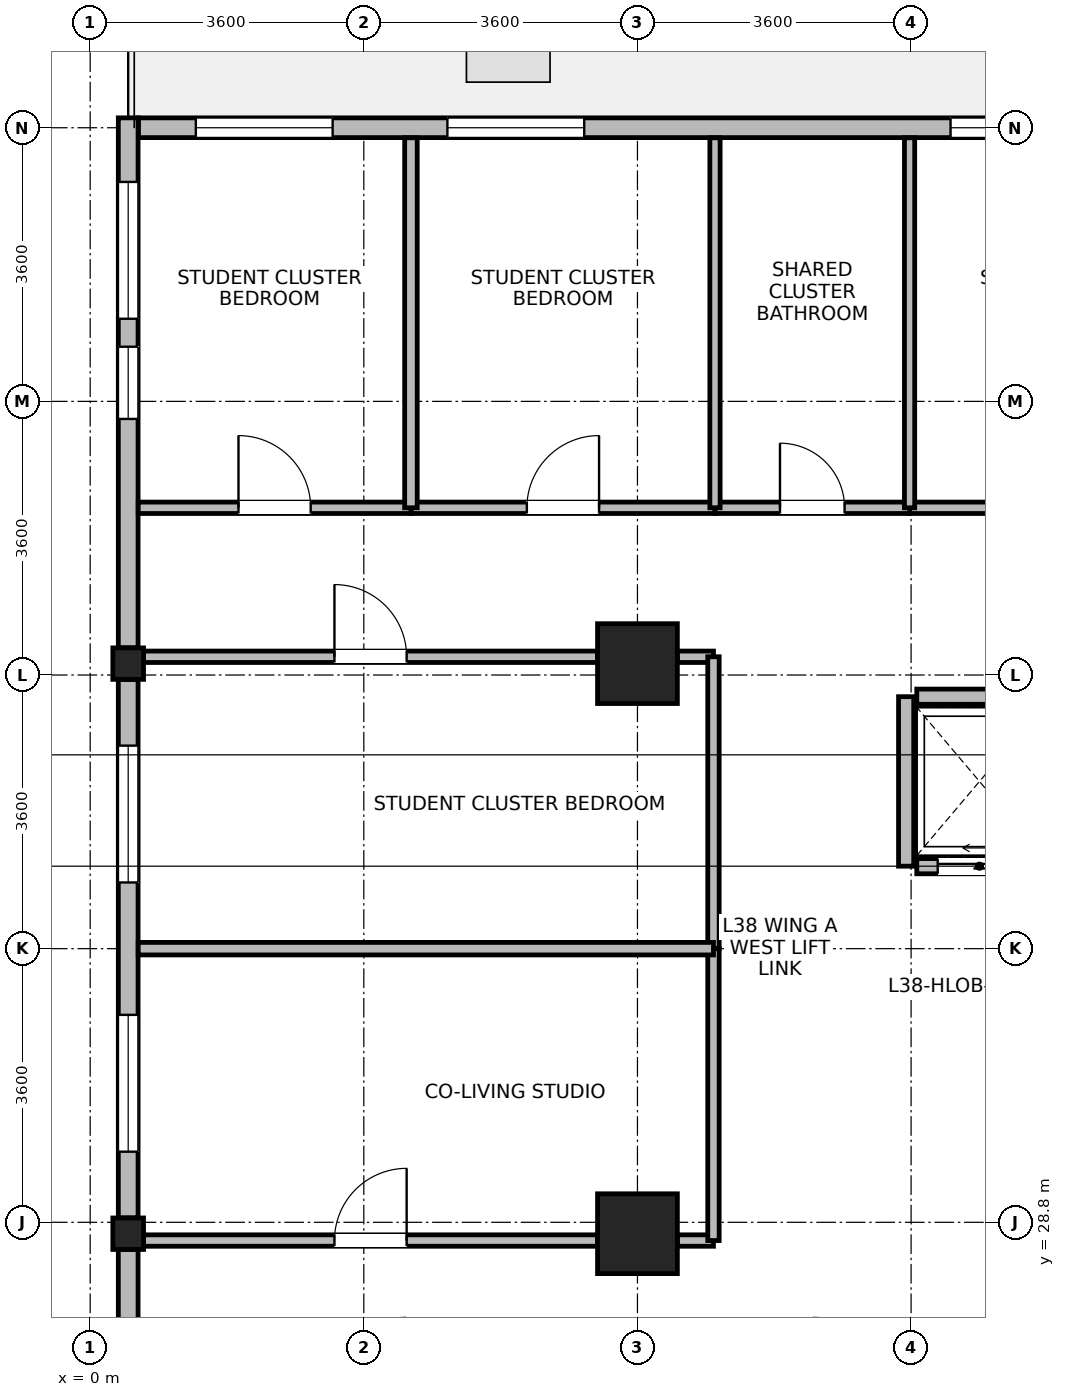
"""IFC4 building model, lengths in metres.
Left out: names, types, materials, properties, quantities, classifications, styles, units other than length and angle.
Written with IfcOpenShell. Run it as: python <this file> out.ifc"""

import sys

from ifc_helpers import new_model, si_unit, direction, frame, frame_2d, origin, origin_2d, place, context, subcontext, project, spatial, rectangle, i_section, extrude, source, transform, mapped, element, fill, save


model = new_model("IFC4")
c1 = context("Model", 3, precision=1e-05, world=origin(), true_north=direction((0.0, 1.0)))
c2 = subcontext(c1, "Body", "Model", "MODEL_VIEW")
j1 = project(units=[si_unit("LENGTHUNIT", "METRE"), si_unit("PLANEANGLEUNIT", "RADIAN")], contexts=[c1])
p1 = place(None, origin())
s1 = spatial("IfcSite", under=j1, at=p1, CompositionType="ELEMENT")
p2 = place(p1, origin())
s2 = spatial("IfcBuilding", under=s1, at=p2, CompositionType="ELEMENT")
p3 = place(p2, frame((0.0, 0.0, 151.3)))
s3 = spatial("IfcBuildingStorey", under=s2, at=p3, CompositionType="ELEMENT", Elevation=151.3)
m1 = source(origin(), c2, "Body", "SweptSolid", [
    extrude(rectangle(XDim=1.05, YDim=1.05, at=origin_2d()), origin(), (0.0, 0.0, 1.0), 3.7),
])
for number, where, z_axis, x_axis in (
    (1, (7.2, 28.65, 0.0), (0.0, 0.0, 1.0), (1.0, 0.0, 0.0)),
    (2, (7.2, 36.15, 0.0), (0.0, 0.0, 1.0), (1.0, 0.0, 0.0)),
):
    element("IfcColumn", number, at=place(p3, frame(where, z_axis=z_axis, x_axis=x_axis)), inside=s3, PredefinedType="COLUMN", context=c2, shape_type="MappedRepresentation", body=[
        mapped(m1, transform((0.0, 0.0, 0.0), x_axis=(1.0, 0.0, 0.0), y_axis=(0.0, 1.0, 0.0), z_axis=(0.0, 0.0, 1.0), scale=1.0)),
    ])
m2 = source(origin(), c2, "Body", "SweptSolid", [
    extrude(i_section(OverallWidth=0.404, OverallDepth=0.414, WebThickness=0.021, FlangeThickness=0.028, FilletRadius=0.015, at=origin_2d()), origin(), (0.0, 0.0, 1.0), 3.7),
])
for number, where, z_axis, x_axis in (
    (3, (0.5, 28.65, 0.0), (0.0, 0.0, 1.0), (1.0, 0.0, 0.0)),
    (4, (0.5, 36.15, 0.0), (0.0, 0.0, 1.0), (1.0, 0.0, 0.0)),
):
    element("IfcColumn", number, at=place(p3, frame(where, z_axis=z_axis, x_axis=x_axis)), inside=s3, PredefinedType="COLUMN", context=c2, shape_type="MappedRepresentation", body=[
        mapped(m2, transform((0.0, 0.0, 0.0), x_axis=(1.0, 0.0, 0.0), y_axis=(0.0, 1.0, 0.0), z_axis=(0.0, 0.0, 1.0), scale=1.0)),
    ])
p4 = place(p3, frame((0.635, 43.2, 0.0), z_axis=(0.0, 0.0, 1.0), x_axis=(1.0, 0.0, 0.0)))
e5 = element("IfcWall", 5, at=p4, inside=s3, PredefinedType="STANDARD", context=c2, shape_type="SweptSolid", body=[
    extrude(rectangle(XDim=13.239, YDim=0.26, at=frame_2d((6.62, 0.0))), origin(), (0.0, 0.0, 1.0), 3.44),
])
p5 = place(p4, frame((0.755, 0.0, 0.85)))
e6 = element("IfcOpeningElement", 6, at=p5, cuts=e5, PredefinedType="OPENING", context=c2, shape_type="SweptSolid", body=[
    extrude(rectangle(XDim=1.8, YDim=1.85, at=frame_2d((0.9, 0.925))), frame((0.0, 0.14, 0.0), z_axis=(0.0, -1.0, 0.0), x_axis=(1.0, 0.0, 0.0)), (0.0, 0.0, 1.0), 0.28),
])
p6 = place(p4, frame((4.065, 0.0, 0.85)))
e7 = element("IfcOpeningElement", 7, at=p6, cuts=e5, PredefinedType="OPENING", context=c2, shape_type="SweptSolid", body=[
    extrude(rectangle(XDim=1.8, YDim=1.85, at=frame_2d((0.9, 0.925))), frame((0.0, 0.14, 0.0), z_axis=(0.0, -1.0, 0.0), x_axis=(1.0, 0.0, 0.0)), (0.0, 0.0, 1.0), 0.28),
])
p7 = place(p4, frame((10.684, 0.0, 0.85)))
e8 = element("IfcOpeningElement", 8, at=p7, cuts=e5, PredefinedType="OPENING", context=c2, shape_type="SweptSolid", body=[
    extrude(rectangle(XDim=1.8, YDim=1.85, at=frame_2d((0.9, 0.925))), frame((0.0, 0.14, 0.0), z_axis=(0.0, -1.0, 0.0), x_axis=(1.0, 0.0, 0.0)), (0.0, 0.0, 1.0), 0.28),
])
p8 = place(p3, frame((0.5, 36.358, 0.0), z_axis=(0.0, 0.0, 1.0), x_axis=(0.0, 1.0, 0.0)))
e9 = element("IfcWall", 9, at=p8, inside=s3, PredefinedType="STANDARD", context=c2, shape_type="SweptSolid", body=[
    extrude(rectangle(XDim=6.972, YDim=0.26, at=frame_2d((3.486, 0.0))), origin(), (0.0, 0.0, 1.0), 3.44),
])
p9 = place(p8, frame((4.329, 0.0, 0.85)))
e10 = element("IfcOpeningElement", 10, at=p9, cuts=e9, PredefinedType="OPENING", context=c2, shape_type="SweptSolid", body=[
    extrude(rectangle(XDim=1.8, YDim=1.85, at=frame_2d((0.9, 0.925))), frame((0.0, 0.14, 0.0), z_axis=(0.0, -1.0, 0.0), x_axis=(1.0, 0.0, 0.0)), (0.0, 0.0, 1.0), 0.28),
])
p10 = place(p8, frame((3.011, 0.0, 0.85)))
e11 = element("IfcOpeningElement", 11, at=p10, cuts=e9, PredefinedType="OPENING", context=c2, shape_type="SweptSolid", body=[
    extrude(rectangle(XDim=0.95, YDim=1.75, at=frame_2d((0.475, 0.875))), frame((0.0, 0.14, 0.0), z_axis=(0.0, -1.0, 0.0), x_axis=(1.0, 0.0, 0.0)), (0.0, 0.0, 1.0), 0.28),
])
p11 = place(p3, frame((0.5, 28.858, 0.0), z_axis=(0.0, 0.0, 1.0), x_axis=(0.0, 1.0, 0.0)))
e12 = element("IfcWall", 12, at=p11, inside=s3, PredefinedType="STANDARD", context=c2, shape_type="SweptSolid", body=[
    extrude(rectangle(XDim=7.084, YDim=0.26, at=frame_2d((3.542, 0.0))), origin(), (0.0, 0.0, 1.0), 2.99),
])
p12 = place(p11, frame((0.871, 0.0, 0.85)))
e13 = element("IfcOpeningElement", 13, at=p12, cuts=e12, PredefinedType="OPENING", context=c2, shape_type="SweptSolid", body=[
    extrude(rectangle(XDim=1.8, YDim=1.85, at=frame_2d((0.9, 0.925))), frame((0.0, 0.14, 0.0), z_axis=(0.0, -1.0, 0.0), x_axis=(1.0, 0.0, 0.0)), (0.0, 0.0, 1.0), 0.28),
])
p13 = place(p11, frame((4.413, 0.0, 0.85)))
e14 = element("IfcOpeningElement", 14, at=p13, cuts=e12, PredefinedType="OPENING", context=c2, shape_type="SweptSolid", body=[
    extrude(rectangle(XDim=1.8, YDim=1.85, at=frame_2d((0.9, 0.925))), frame((0.0, 0.14, 0.0), z_axis=(0.0, -1.0, 0.0), x_axis=(1.0, 0.0, 0.0)), (0.0, 0.0, 1.0), 0.28),
])
p14 = place(p3, frame((0.5, 21.47, 0.0), z_axis=(0.0, 0.0, 1.0), x_axis=(0.0, 1.0, 0.0)))
e15 = element("IfcWall", 15, at=p14, inside=s3, PredefinedType="STANDARD", context=c2, shape_type="SweptSolid", body=[
    extrude(rectangle(XDim=6.972, YDim=0.26, at=frame_2d((3.486, 0.0))), origin(), (0.0, 0.0, 1.0), 3.44),
])
p15 = place(p14, frame((0.843, 0.0, 0.85)))
e16 = element("IfcOpeningElement", 16, at=p15, cuts=e15, PredefinedType="OPENING", context=c2, shape_type="SweptSolid", body=[
    extrude(rectangle(XDim=1.8, YDim=1.85, at=frame_2d((0.9, 0.925))), frame((0.0, 0.14, 0.0), z_axis=(0.0, -1.0, 0.0), x_axis=(1.0, 0.0, 0.0)), (0.0, 0.0, 1.0), 0.28),
])
p16 = place(p14, frame((3.011, 0.0, 0.85)))
e17 = element("IfcOpeningElement", 17, at=p16, cuts=e15, PredefinedType="OPENING", context=c2, shape_type="SweptSolid", body=[
    extrude(rectangle(XDim=0.95, YDim=1.75, at=frame_2d((0.475, 0.875))), frame((0.0, 0.14, 0.0), z_axis=(0.0, -1.0, 0.0), x_axis=(1.0, 0.0, 0.0)), (0.0, 0.0, 1.0), 0.28),
])
p17 = place(p3, frame((10.875, 33.485, 0.0), z_axis=(0.0, 0.0, 1.0), x_axis=(1.0, 0.0, 0.0)))
e18 = element("IfcWall", 18, at=p17, inside=s3, PredefinedType="PARTITIONING", context=c2, shape_type="SweptSolid", body=[
    extrude(rectangle(XDim=1.65, YDim=0.2, at=frame_2d((0.825, 0.0))), origin(), (0.0, 0.0, 1.0), 3.44),
])
p18 = place(p17, frame((0.275, 0.0, 0.0)))
e19 = element("IfcOpeningElement", 19, at=p18, cuts=e18, PredefinedType="OPENING", context=c2, shape_type="SweptSolid", body=[
    extrude(rectangle(XDim=1.1, YDim=2.12, at=frame_2d((0.55, 1.06))), frame((0.0, 0.11, 0.0), z_axis=(0.0, -1.0, 0.0), x_axis=(1.0, 0.0, 0.0)), (0.0, 0.0, 1.0), 0.22),
])
p19 = place(p3, frame((10.875, 35.715, 0.0), z_axis=(0.0, 0.0, 1.0), x_axis=(1.0, 0.0, 0.0)))
e20 = element("IfcWall", 20, at=p19, inside=s3, PredefinedType="PARTITIONING", context=c2, shape_type="SweptSolid", body=[
    extrude(rectangle(XDim=1.65, YDim=0.2, at=frame_2d((0.825, 0.0))), origin(), (0.0, 0.0, 1.0), 3.44),
])
p20 = place(p3, frame((10.735, 33.485, 0.0), z_axis=(0.0, 0.0, 1.0), x_axis=(0.0, 1.0, 0.0)))
e21 = element("IfcWall", 21, at=p20, inside=s3, PredefinedType="PARTITIONING", context=c2, shape_type="SweptSolid", body=[
    extrude(rectangle(XDim=2.23, YDim=0.2, at=frame_2d((1.115, 0.0))), origin(), (0.0, 0.0, 1.0), 3.44),
])
p21 = place(p3, frame((0.702, 28.56, 0.0), z_axis=(0.0, 0.0, 1.0), x_axis=(1.0, 0.0, 0.0)))
e22 = element("IfcWall", 22, at=p21, inside=s3, PredefinedType="PARTITIONING", context=c2, shape_type="SweptSolid", body=[
    extrude(rectangle(XDim=5.973, YDim=0.15, at=frame_2d((2.987, 0.0))), origin(), (0.0, 0.0, 1.0), 2.84),
])
p22 = place(p21, frame((2.511, 0.0, 0.0)))
e23 = element("IfcOpeningElement", 23, at=p22, cuts=e22, PredefinedType="OPENING", context=c2, shape_type="SweptSolid", body=[
    extrude(rectangle(XDim=0.95, YDim=2.1, at=frame_2d((0.475, 1.05))), frame((0.0, 0.085, 0.0), z_axis=(0.0, -1.0, 0.0), x_axis=(1.0, 0.0, 0.0)), (0.0, 0.0, 1.0), 0.17),
])
p23 = place(p3, frame((7.725, 28.56, 0.0), z_axis=(0.0, 0.0, 1.0), x_axis=(1.0, 0.0, 0.0)))
e24 = element("IfcWall", 24, at=p23, inside=s3, PredefinedType="PARTITIONING", context=c2, shape_type="SweptSolid", body=[
    extrude(rectangle(XDim=0.475, YDim=0.15, at=frame_2d((0.237, 0.0))), origin(), (0.0, 0.0, 1.0), 2.84),
])
p24 = place(p3, frame((0.702, 36.24, 0.0), z_axis=(0.0, 0.0, 1.0), x_axis=(1.0, 0.0, 0.0)))
e25 = element("IfcWall", 25, at=p24, inside=s3, PredefinedType="PARTITIONING", context=c2, shape_type="SweptSolid", body=[
    extrude(rectangle(XDim=5.973, YDim=0.15, at=frame_2d((2.987, 0.0))), origin(), (0.0, 0.0, 1.0), 2.84),
])
p25 = place(p24, frame((2.511, 0.0, 0.0)))
e26 = element("IfcOpeningElement", 26, at=p25, cuts=e25, PredefinedType="OPENING", context=c2, shape_type="SweptSolid", body=[
    extrude(rectangle(XDim=0.95, YDim=2.1, at=frame_2d((0.475, 1.05))), frame((0.0, 0.085, 0.0), z_axis=(0.0, -1.0, 0.0), x_axis=(1.0, 0.0, 0.0)), (0.0, 0.0, 1.0), 0.17),
])
p26 = place(p3, frame((7.725, 36.24, 0.0), z_axis=(0.0, 0.0, 1.0), x_axis=(1.0, 0.0, 0.0)))
e27 = element("IfcWall", 27, at=p26, inside=s3, PredefinedType="PARTITIONING", context=c2, shape_type="SweptSolid", body=[
    extrude(rectangle(XDim=0.475, YDim=0.15, at=frame_2d((0.237, 0.0))), origin(), (0.0, 0.0, 1.0), 2.84),
])
p27 = place(p3, frame((10.78, 38.2, 0.0), z_axis=(0.0, 0.0, 1.0), x_axis=(1.0, 0.0, 0.0)))
e28 = element("IfcWall", 28, at=p27, inside=s3, PredefinedType="PARTITIONING", context=c2, shape_type="SweptSolid", body=[
    extrude(rectangle(XDim=4.3, YDim=0.15, at=frame_2d((2.15, 0.0))), origin(), (0.0, 0.0, 1.0), 3.44),
])
p28 = place(p27, frame((1.675, 0.0, 0.0)))
e29 = element("IfcOpeningElement", 29, at=p28, cuts=e28, PredefinedType="OPENING", context=c2, shape_type="SweptSolid", body=[
    extrude(rectangle(XDim=0.95, YDim=2.1, at=frame_2d((0.475, 1.05))), frame((0.0, 0.085, 0.0), z_axis=(0.0, -1.0, 0.0), x_axis=(1.0, 0.0, 0.0)), (0.0, 0.0, 1.0), 0.17),
])
p29 = place(p3, frame((4.22, 38.2, 0.0), z_axis=(0.0, 0.0, 1.0), x_axis=(1.0, 0.0, 0.0)))
e30 = element("IfcWall", 30, at=p29, inside=s3, PredefinedType="PARTITIONING", context=c2, shape_type="SweptSolid", body=[
    extrude(rectangle(XDim=4.0, YDim=0.15, at=frame_2d((2.0, 0.0))), origin(), (0.0, 0.0, 1.0), 3.44),
])
p30 = place(p29, frame((1.525, 0.0, 0.0)))
e31 = element("IfcOpeningElement", 31, at=p30, cuts=e30, PredefinedType="OPENING", context=c2, shape_type="SweptSolid", body=[
    extrude(rectangle(XDim=0.95, YDim=2.1, at=frame_2d((0.475, 1.05))), frame((0.0, 0.085, 0.0), z_axis=(0.0, -1.0, 0.0), x_axis=(1.0, 0.0, 0.0)), (0.0, 0.0, 1.0), 0.17),
])
p31 = place(p3, frame((8.2, 32.4, 0.0), z_axis=(0.0, 0.0, 1.0), x_axis=(0.0, 1.0, 0.0)))
e32 = element("IfcWall", 32, at=p31, inside=s3, PredefinedType="PARTITIONING", context=c2, shape_type="SweptSolid", body=[
    extrude(rectangle(XDim=3.84, YDim=0.15, at=frame_2d((1.92, 0.0))), origin(), (0.0, 0.0, 1.0), 3.44),
])
p32 = place(p3, frame((8.2, 28.56, 0.0), z_axis=(0.0, 0.0, 1.0), x_axis=(0.0, 1.0, 0.0)))
e33 = element("IfcWall", 33, at=p32, inside=s3, PredefinedType="PARTITIONING", context=c2, shape_type="SweptSolid", body=[
    extrude(rectangle(XDim=3.84, YDim=0.15, at=frame_2d((1.92, 0.0))), origin(), (0.0, 0.0, 1.0), 3.44),
])
p33 = place(p3, frame((0.632, 38.2, 0.0), z_axis=(0.0, 0.0, 1.0), x_axis=(1.0, 0.0, 0.0)))
e34 = element("IfcWall", 34, at=p33, inside=s3, PredefinedType="PARTITIONING", context=c2, shape_type="SweptSolid", body=[
    extrude(rectangle(XDim=3.588, YDim=0.15, at=frame_2d((1.794, 0.0))), origin(), (0.0, 0.0, 1.0), 3.44),
])
p34 = place(p33, frame((1.319, 0.0, 0.0)))
e35 = element("IfcOpeningElement", 35, at=p34, cuts=e34, PredefinedType="OPENING", context=c2, shape_type="SweptSolid", body=[
    extrude(rectangle(XDim=0.95, YDim=2.1, at=frame_2d((0.475, 1.05))), frame((0.0, 0.085, 0.0), z_axis=(0.0, -1.0, 0.0), x_axis=(1.0, 0.0, 0.0)), (0.0, 0.0, 1.0), 0.17),
])
p35 = place(p3, frame((8.22, 38.2, 0.0), z_axis=(0.0, 0.0, 1.0), x_axis=(1.0, 0.0, 0.0)))
e36 = element("IfcWall", 36, at=p35, inside=s3, PredefinedType="PARTITIONING", context=c2, shape_type="SweptSolid", body=[
    extrude(rectangle(XDim=2.56, YDim=0.15, at=frame_2d((1.28, 0.0))), origin(), (0.0, 0.0, 1.0), 3.44),
])
p36 = place(p35, frame((0.855, 0.0, 0.0)))
e37 = element("IfcOpeningElement", 37, at=p36, cuts=e36, PredefinedType="OPENING", context=c2, shape_type="SweptSolid", body=[
    extrude(rectangle(XDim=0.85, YDim=2.04, at=frame_2d((0.425, 1.02))), frame((0.0, 0.085, 0.0), z_axis=(0.0, -1.0, 0.0), x_axis=(1.0, 0.0, 0.0)), (0.0, 0.0, 1.0), 0.17),
])
p37 = place(p3, frame((0.632, 32.4, 0.0), z_axis=(0.0, 0.0, 1.0), x_axis=(1.0, 0.0, 0.0)))
e38 = element("IfcWall", 38, at=p37, inside=s3, PredefinedType="PARTITIONING", context=c2, shape_type="SweptSolid", body=[
    extrude(rectangle(XDim=7.568, YDim=0.165, at=frame_2d((3.784, 0.0))), origin(), (0.0, 0.0, 1.0), 3.44),
])
p38 = place(p3, frame((4.22, 38.2, 0.0), z_axis=(0.0, 0.0, 1.0), x_axis=(0.0, 1.0, 0.0)))
e39 = element("IfcWall", 39, at=p38, inside=s3, PredefinedType="PARTITIONING", context=c2, shape_type="SweptSolid", body=[
    extrude(rectangle(XDim=4.868, YDim=0.165, at=frame_2d((2.434, 0.0))), origin(), (0.0, 0.0, 1.0), 3.44),
])
for number, where, z_axis, x_axis in (
    (40, (8.22, 38.2, 0.0), (0.0, 0.0, 1.0), (0.0, 1.0, 0.0)),
    (41, (10.78, 38.2, 0.0), (0.0, 0.0, 1.0), (0.0, 1.0, 0.0)),
):
    element("IfcWall", number, at=place(p3, frame(where, z_axis=z_axis, x_axis=x_axis)), inside=s3, PredefinedType="PARTITIONING", context=c2, shape_type="SweptSolid", body=[
        extrude(rectangle(XDim=4.868, YDim=0.135, at=frame_2d((2.434, 0.0))), origin(), (0.0, 0.0, 1.0), 3.44),
    ])
p39 = place(p5, origin())
e42 = element("IfcWindow", 42, at=p39, inside=s3, PartitioningType="SINGLE_PANEL", PredefinedType="WINDOW", context=c2, shape_type="SweptSolid", body=[
    extrude(rectangle(XDim=1.8, YDim=1.85, at=frame_2d((0.9, 0.925))), frame((0.0, 0.03, 0.0), z_axis=(0.0, -1.0, 0.0), x_axis=(1.0, 0.0, 0.0)), (0.0, 0.0, 1.0), 0.06),
])
fill(e6, e42)
p40 = place(p6, origin())
e43 = element("IfcWindow", 43, at=p40, inside=s3, PartitioningType="SINGLE_PANEL", PredefinedType="WINDOW", context=c2, shape_type="SweptSolid", body=[
    extrude(rectangle(XDim=1.8, YDim=1.85, at=frame_2d((0.9, 0.925))), frame((0.0, 0.03, 0.0), z_axis=(0.0, -1.0, 0.0), x_axis=(1.0, 0.0, 0.0)), (0.0, 0.0, 1.0), 0.06),
])
fill(e7, e43)
p41 = place(p7, origin())
e44 = element("IfcWindow", 44, at=p41, inside=s3, PartitioningType="SINGLE_PANEL", PredefinedType="WINDOW", context=c2, shape_type="SweptSolid", body=[
    extrude(rectangle(XDim=1.8, YDim=1.85, at=frame_2d((0.9, 0.925))), frame((0.0, 0.03, 0.0), z_axis=(0.0, -1.0, 0.0), x_axis=(1.0, 0.0, 0.0)), (0.0, 0.0, 1.0), 0.06),
])
fill(e8, e44)
p42 = place(p9, origin())
e45 = element("IfcWindow", 45, at=p42, inside=s3, PartitioningType="SINGLE_PANEL", PredefinedType="WINDOW", context=c2, shape_type="SweptSolid", body=[
    extrude(rectangle(XDim=1.8, YDim=1.85, at=frame_2d((0.9, 0.925))), frame((0.0, 0.03, 0.0), z_axis=(0.0, -1.0, 0.0), x_axis=(1.0, 0.0, 0.0)), (0.0, 0.0, 1.0), 0.06),
])
fill(e10, e45)
p43 = place(p10, origin())
e46 = element("IfcWindow", 46, at=p43, inside=s3, PartitioningType="SINGLE_PANEL", PredefinedType="WINDOW", context=c2, shape_type="SweptSolid", body=[
    extrude(rectangle(XDim=0.95, YDim=1.75, at=frame_2d((0.475, 0.875))), frame((0.0, 0.03, 0.0), z_axis=(0.0, -1.0, 0.0), x_axis=(1.0, 0.0, 0.0)), (0.0, 0.0, 1.0), 0.06),
])
fill(e11, e46)
p44 = place(p12, origin())
e47 = element("IfcWindow", 47, at=p44, inside=s3, PartitioningType="SINGLE_PANEL", PredefinedType="WINDOW", context=c2, shape_type="SweptSolid", body=[
    extrude(rectangle(XDim=1.8, YDim=1.85, at=frame_2d((0.9, 0.925))), frame((0.0, 0.03, 0.0), z_axis=(0.0, -1.0, 0.0), x_axis=(1.0, 0.0, 0.0)), (0.0, 0.0, 1.0), 0.06),
])
fill(e13, e47)
p45 = place(p13, origin())
e48 = element("IfcWindow", 48, at=p45, inside=s3, PartitioningType="SINGLE_PANEL", PredefinedType="WINDOW", context=c2, shape_type="SweptSolid", body=[
    extrude(rectangle(XDim=1.8, YDim=1.85, at=frame_2d((0.9, 0.925))), frame((0.0, 0.03, 0.0), z_axis=(0.0, -1.0, 0.0), x_axis=(1.0, 0.0, 0.0)), (0.0, 0.0, 1.0), 0.06),
])
fill(e14, e48)
p46 = place(p18, origin())
e49 = element("IfcDoor", 49, at=p46, inside=s3, OperationType="SLIDING_TO_LEFT", PredefinedType="DOOR", context=c2, shape_type="SweptSolid", body=[
    extrude(rectangle(XDim=1.1, YDim=2.12, at=frame_2d((0.55, 1.06))), frame((0.0, 0.025, 0.0), z_axis=(0.0, -1.0, 0.0), x_axis=(1.0, 0.0, 0.0)), (0.0, 0.0, 1.0), 0.05),
])
fill(e19, e49)
p47 = place(p22, origin())
e50 = element("IfcDoor", 50, at=p47, inside=s3, OperationType="SINGLE_SWING_RIGHT", PredefinedType="DOOR", context=c2, shape_type="SweptSolid", body=[
    extrude(rectangle(XDim=0.95, YDim=2.1, at=frame_2d((0.475, 1.05))), frame((0.0, 0.025, 0.0), z_axis=(0.0, -1.0, 0.0), x_axis=(1.0, 0.0, 0.0)), (0.0, 0.0, 1.0), 0.05),
])
fill(e23, e50)
p48 = place(p25, origin())
e51 = element("IfcDoor", 51, at=p48, inside=s3, OperationType="SINGLE_SWING_LEFT", PredefinedType="DOOR", context=c2, shape_type="SweptSolid", body=[
    extrude(rectangle(XDim=0.95, YDim=2.1, at=frame_2d((0.475, 1.05))), frame((0.0, 0.025, 0.0), z_axis=(0.0, -1.0, 0.0), x_axis=(1.0, 0.0, 0.0)), (0.0, 0.0, 1.0), 0.05),
])
fill(e26, e51)
p49 = place(p30, origin())
e52 = element("IfcDoor", 52, at=p49, inside=s3, OperationType="SINGLE_SWING_RIGHT", PredefinedType="DOOR", context=c2, shape_type="SweptSolid", body=[
    extrude(rectangle(XDim=0.95, YDim=2.1, at=frame_2d((0.475, 1.05))), frame((0.0, 0.025, 0.0), z_axis=(0.0, -1.0, 0.0), x_axis=(1.0, 0.0, 0.0)), (0.0, 0.0, 1.0), 0.05),
])
fill(e31, e52)
p50 = place(p34, origin())
e53 = element("IfcDoor", 53, at=p50, inside=s3, OperationType="SINGLE_SWING_LEFT", PredefinedType="DOOR", context=c2, shape_type="SweptSolid", body=[
    extrude(rectangle(XDim=0.95, YDim=2.1, at=frame_2d((0.475, 1.05))), frame((0.0, 0.025, 0.0), z_axis=(0.0, -1.0, 0.0), x_axis=(1.0, 0.0, 0.0)), (0.0, 0.0, 1.0), 0.05),
])
fill(e35, e53)
p51 = place(p36, origin())
e54 = element("IfcDoor", 54, at=p51, inside=s3, OperationType="SINGLE_SWING_LEFT", PredefinedType="DOOR", context=c2, shape_type="SweptSolid", body=[
    extrude(rectangle(XDim=0.85, YDim=2.04, at=frame_2d((0.425, 1.02))), frame((0.0, 0.025, 0.0), z_axis=(0.0, -1.0, 0.0), x_axis=(1.0, 0.0, 0.0)), (0.0, 0.0, 1.0), 0.05),
])
fill(e37, e54)
save(model, sys.argv[1])
